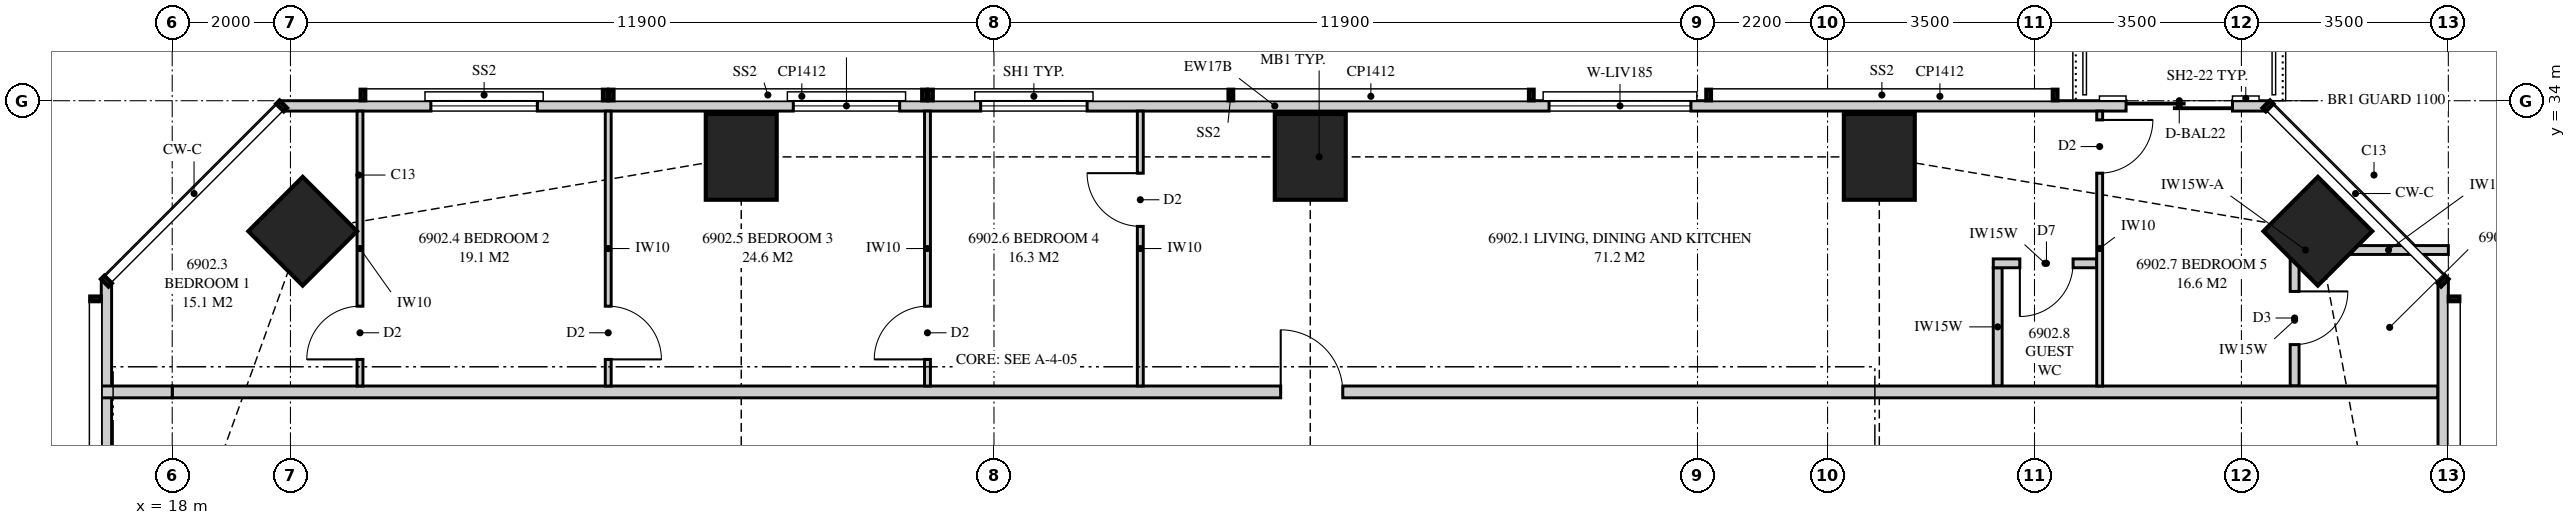
"""IFC4 building model, lengths in metres.
Left out: names, types, materials, properties, quantities, classifications, styles, units other than length and angle.
Written with IfcOpenShell. Run it as: python <this file> out.ifc"""

import sys

from ifc_helpers import new_model, si_unit, direction, frame, frame_2d, origin, origin_2d, place, context, subcontext, project, spatial, polyline, rectangle, outline, extrude, element, fill, save


model = new_model("IFC4")
c1 = context("Model", 3, precision=1e-05, world=origin(), true_north=direction((0.0, 1.0)))
c2 = subcontext(c1, "Body", "Model", "MODEL_VIEW")
j1 = project(units=[si_unit("LENGTHUNIT", "METRE"), si_unit("PLANEANGLEUNIT", "RADIAN")], contexts=[c1])
p1 = place(None, origin())
s1 = spatial("IfcSite", under=j1, at=p1, CompositionType="ELEMENT")
p2 = place(p1, origin())
s2 = spatial("IfcBuilding", under=s1, at=p2, CompositionType="ELEMENT")
p3 = place(p2, frame((0.0, 0.0, 252.95)))
s3 = spatial("IfcBuildingStorey", under=s2, at=p3, CompositionType="ELEMENT", Elevation=252.95)
p4 = place(p3, frame((54.293, 31.793, 0.0), z_axis=(0.0, 0.0, 1.0), x_axis=(0.707106781187, 0.707106781187, 0.0)))
e1 = element("IfcColumn", 1, at=p4, inside=s3, PredefinedType="COLUMN", context=c2, shape_type="SweptSolid", body=[
    extrude(rectangle(XDim=1.3, YDim=1.3, at=origin_2d()), origin(), (0.0, 0.0, 1.0), 3.5),
])
for number, where, z_axis, x_axis in (
    (2, (46.875, 33.05, 0.0), (0.0, 0.0, 1.0), (0.0, 1.0, 0.0)),
    (3, (37.25, 33.05, 0.0), (0.0, 0.0, 1.0), (0.0, 1.0, 0.0)),
    (4, (27.625, 33.05, 0.0), (0.0, 0.0, 1.0), (0.0, 1.0, 0.0)),
):
    element("IfcColumn", number, at=place(p3, frame(where, z_axis=z_axis, x_axis=x_axis)), inside=s3, PredefinedType="COLUMN", context=c2, shape_type="SweptSolid", body=[
        extrude(rectangle(XDim=1.45, YDim=1.2, at=origin_2d()), origin(), (0.0, 0.0, 1.0), 3.5),
    ])
p5 = place(p3, frame((20.207, 31.793, 0.0), z_axis=(0.0, 0.0, 1.0), x_axis=(0.707106781187, 0.707106781187, 0.0)))
e5 = element("IfcColumn", 5, at=p5, inside=s3, PredefinedType="COLUMN", context=c2, shape_type="SweptSolid", body=[
    extrude(rectangle(XDim=1.3, YDim=1.3, at=origin_2d()), origin(), (0.0, 0.0, 1.0), 3.5),
])
p6 = place(p3, frame((56.413, 3.051, 0.0), z_axis=(0.0, 0.0, 1.0), x_axis=(0.0, 1.0, 0.0)))
e6 = element("IfcWall", 6, at=p6, inside=s3, PredefinedType="SOLIDWALL", context=c2, shape_type="SweptSolid", body=[
    extrude(outline(polyline([(0.0, 0.0), (27.897, 0.0), (27.897, 3.26), (22.157, 3.26), (22.157, 2.3), (22.092, 2.3), (22.092, 3.26), (21.949, 3.26), (21.949, 2.3), (9.949, 2.3), (9.949, 3.26), (9.858, 3.26), (9.858, 2.3), (9.688, 2.3), (9.688, 3.26), (0.0, 3.26), (0.0, 0.0)])), frame((0.0, 0.087, 0.0), z_axis=(0.0, -1.0, 0.0), x_axis=(1.0, 0.0, 0.0)), (0.0, 0.0, 1.0), 0.175),
])
p7 = place(p6, frame((10.831, 0.0, 0.4)))
e7 = element("IfcOpeningElement", 7, at=p7, cuts=e6, PredefinedType="OPENING", context=c2, shape_type="SweptSolid", body=[
    extrude(rectangle(XDim=2.4, YDim=1.85, at=frame_2d((1.2, 0.925))), frame((0.0, 0.097, 0.0), z_axis=(0.0, -1.0, 0.0), x_axis=(1.0, 0.0, 0.0)), (0.0, 0.0, 1.0), 0.195),
])
p8 = place(p6, frame((15.074, 0.0, 0.0)))
e8 = element("IfcOpeningElement", 8, at=p8, cuts=e6, PredefinedType="OPENING", context=c2, shape_type="SweptSolid", body=[
    extrude(rectangle(XDim=1.8, YDim=2.25, at=frame_2d((0.9, 1.125))), frame((0.0, 0.097, 0.0), z_axis=(0.0, -1.0, 0.0), x_axis=(1.0, 0.0, 0.0)), (0.0, 0.0, 1.0), 0.195),
])
p9 = place(p6, frame((18.699, 0.0, 0.4)))
e9 = element("IfcOpeningElement", 9, at=p9, cuts=e6, PredefinedType="OPENING", context=c2, shape_type="SweptSolid", body=[
    extrude(rectangle(XDim=2.4, YDim=1.85, at=frame_2d((1.2, 0.925))), frame((0.0, 0.097, 0.0), z_axis=(0.0, -1.0, 0.0), x_axis=(1.0, 0.0, 0.0)), (0.0, 0.0, 1.0), 0.195),
])
p10 = place(p3, frame((53.449, 33.913, 0.0), z_axis=(0.0, 0.0, 1.0), x_axis=(-1.0, 0.0, 0.0)))
e10 = element("IfcWall", 10, at=p10, inside=s3, PredefinedType="SOLIDWALL", context=c2, shape_type="SweptSolid", body=[
    extrude(outline(polyline([(0.0, 0.0), (33.597, 0.0), (33.597, 3.26), (26.039, 3.26), (26.039, 2.3), (25.955, 2.3), (25.955, 3.26), (25.824, 3.26), (25.824, 2.3), (6.574, 2.3), (6.574, 3.26), (6.442, 3.26), (6.442, 2.3), (6.359, 2.3), (6.359, 3.26), (0.0, 3.26), (0.0, 0.0)])), frame((0.0, 0.087, 0.0), z_axis=(0.0, -1.0, 0.0), x_axis=(1.0, 0.0, 0.0)), (0.0, 0.0, 1.0), 0.175),
])
p11 = place(p10, frame((0.6, 0.0, 0.0)))
e11 = element("IfcOpeningElement", 11, at=p11, cuts=e10, PredefinedType="OPENING", context=c2, shape_type="SweptSolid", body=[
    extrude(rectangle(XDim=1.8, YDim=2.25, at=frame_2d((0.9, 1.125))), frame((0.0, 0.097, 0.0), z_axis=(0.0, -1.0, 0.0), x_axis=(1.0, 0.0, 0.0)), (0.0, 0.0, 1.0), 0.195),
])
p12 = place(p10, frame((9.76, 0.0, 0.4)))
e12 = element("IfcOpeningElement", 12, at=p12, cuts=e10, PredefinedType="OPENING", context=c2, shape_type="SweptSolid", body=[
    extrude(rectangle(XDim=2.4, YDim=1.85, at=frame_2d((1.2, 0.925))), frame((0.0, 0.097, 0.0), z_axis=(0.0, -1.0, 0.0), x_axis=(1.0, 0.0, 0.0)), (0.0, 0.0, 1.0), 0.195),
])
p13 = place(p10, frame((19.974, 0.0, 0.4)))
e13 = element("IfcOpeningElement", 13, at=p13, cuts=e10, PredefinedType="OPENING", context=c2, shape_type="SweptSolid", body=[
    extrude(rectangle(XDim=1.8, YDim=1.85, at=frame_2d((0.9, 0.925))), frame((0.0, 0.097, 0.0), z_axis=(0.0, -1.0, 0.0), x_axis=(1.0, 0.0, 0.0)), (0.0, 0.0, 1.0), 0.195),
])
p14 = place(p10, frame((23.144, 0.0, 0.4)))
e14 = element("IfcOpeningElement", 14, at=p14, cuts=e10, PredefinedType="OPENING", context=c2, shape_type="SweptSolid", body=[
    extrude(rectangle(XDim=1.8, YDim=1.85, at=frame_2d((0.9, 0.925))), frame((0.0, 0.097, 0.0), z_axis=(0.0, -1.0, 0.0), x_axis=(1.0, 0.0, 0.0)), (0.0, 0.0, 1.0), 0.195),
])
p15 = place(p10, frame((29.273, 0.0, 0.4)))
e15 = element("IfcOpeningElement", 15, at=p15, cuts=e10, PredefinedType="OPENING", context=c2, shape_type="SweptSolid", body=[
    extrude(rectangle(XDim=1.8, YDim=1.85, at=frame_2d((0.9, 0.925))), frame((0.0, 0.097, 0.0), z_axis=(0.0, -1.0, 0.0), x_axis=(1.0, 0.0, 0.0)), (0.0, 0.0, 1.0), 0.195),
])
p16 = place(p3, frame((16.887, 30.949, 0.0), z_axis=(0.0, 0.0, 1.0), x_axis=(0.0, -1.0, 0.0)))
e16 = element("IfcWall", 16, at=p16, inside=s3, PredefinedType="SOLIDWALL", context=c2, shape_type="SweptSolid", body=[
    extrude(outline(polyline([(0.0, 0.0), (27.897, 0.0), (27.897, 3.26), (18.148, 3.26), (18.148, 2.3), (18.125, 2.3), (18.125, 3.26), (17.949, 3.26), (17.949, 2.3), (5.949, 2.3), (5.949, 3.26), (0.0, 3.26), (0.0, 0.0)])), frame((0.0, 0.087, 0.0), z_axis=(0.0, -1.0, 0.0), x_axis=(1.0, 0.0, 0.0)), (0.0, 0.0, 1.0), 0.175),
])
p17 = place(p16, frame((11.849, 0.0, 0.4)))
e17 = element("IfcOpeningElement", 17, at=p17, cuts=e16, PredefinedType="OPENING", context=c2, shape_type="SweptSolid", body=[
    extrude(rectangle(XDim=1.2, YDim=1.85, at=frame_2d((0.6, 0.925))), frame((0.0, 0.097, 0.0), z_axis=(0.0, -1.0, 0.0), x_axis=(1.0, 0.0, 0.0)), (0.0, 0.0, 1.0), 0.195),
])
p18 = place(p3, frame((18.0, 29.075, 0.0), z_axis=(0.0, 0.0, 1.0), x_axis=(1.0, 0.0, 0.0)))
e18 = element("IfcWall", 18, at=p18, inside=s3, PredefinedType="PARTITIONING", context=c2, shape_type="SweptSolid", body=[
    extrude(outline(polyline([(0.0, 0.0), (38.325, 0.0), (38.325, 3.26), (37.721, 3.26), (37.721, 2.3), (35.87, 2.3), (35.87, 3.26), (30.185, 3.26), (30.185, 2.66), (27.565, 2.66), (27.565, 3.26), (20.56, 3.26), (20.56, 2.66), (17.94, 2.66), (17.94, 3.26), (10.935, 3.26), (10.935, 2.66), (8.315, 2.66), (8.315, 3.26), (2.192, 3.26), (2.192, 2.3), (0.256, 2.3), (0.256, 3.26), (0.0, 3.26), (0.0, 0.0)])), frame((0.0, 0.1, 0.0), z_axis=(0.0, -1.0, 0.0), x_axis=(1.0, 0.0, 0.0)), (0.0, 0.0, 1.0), 0.2),
])
p19 = place(p18, frame((18.75, 0.0, 0.0)))
e19 = element("IfcOpeningElement", 19, at=p19, cuts=e18, PredefinedType="OPENING", context=c2, shape_type="SweptSolid", body=[
    extrude(rectangle(XDim=1.05, YDim=2.2, at=frame_2d((0.525, 1.1))), frame((0.0, 0.11, 0.0), z_axis=(0.0, -1.0, 0.0), x_axis=(1.0, 0.0, 0.0)), (0.0, 0.0, 1.0), 0.22),
])
p20 = place(p3, frame((53.975, 31.475, 0.0), z_axis=(0.0, 0.0, 1.0), x_axis=(1.0, 0.0, 0.0)))
e20 = element("IfcWall", 20, at=p20, inside=s3, PredefinedType="PLUMBINGWALL", context=c2, shape_type="SweptSolid", body=[
    extrude(rectangle(XDim=0.217, YDim=0.15, at=frame_2d((0.108, 0.0))), origin(), (0.0, 0.0, 1.0), 2.3),
])
p21 = place(p3, frame((54.478, 31.475, 0.0), z_axis=(0.0, 0.0, 1.0), x_axis=(1.0, 0.0, 0.0)))
e21 = element("IfcWall", 21, at=p21, inside=s3, PredefinedType="PLUMBINGWALL", context=c2, shape_type="SweptSolid", body=[
    extrude(outline(polyline([(0.774, 3.26), (0.774, 2.3), (0.325, 2.3), (0.0, 1.15), (0.325, 0.0), (2.022, 0.0), (2.022, 3.26), (0.774, 3.26)])), frame((0.0, 0.075, 0.0), z_axis=(0.0, -1.0, 0.0), x_axis=(1.0, 0.0, 0.0)), (0.0, 0.0, 1.0), 0.15),
])
p22 = place(p3, frame((53.9, 31.4, 0.0), z_axis=(0.0, 0.0, 1.0), x_axis=(0.0, -1.0, 0.0)))
e22 = element("IfcWall", 22, at=p22, inside=s3, PredefinedType="PLUMBINGWALL", context=c2, shape_type="SweptSolid", body=[
    extrude(outline(polyline([(0.0, 0.0), (2.225, 0.0), (2.225, 3.26), (2.225, 2.3), (0.438, 2.3), (0.0, 2.3), (0.0, 3.26), (0.0, 0.0)])), frame((0.0, 0.075, 0.0), z_axis=(0.0, -1.0, 0.0), x_axis=(1.0, 0.0, 0.0)), (0.0, 0.0, 1.0), 0.15),
])
p23 = place(p22, frame((0.625, 0.0, 0.0)))
e23 = element("IfcOpeningElement", 23, at=p23, cuts=e22, PredefinedType="OPENING", context=c2, shape_type="SweptSolid", body=[
    extrude(rectangle(XDim=0.9, YDim=2.1, at=frame_2d((0.45, 1.05))), frame((0.0, 0.085, 0.0), z_axis=(0.0, -1.0, 0.0), x_axis=(1.0, 0.0, 0.0)), (0.0, 0.0, 1.0), 0.17),
])
p24 = place(p3, frame((21.176, 33.825, 0.0), z_axis=(0.0, 0.0, 1.0), x_axis=(0.0, -1.0, 0.0)))
e24 = element("IfcWall", 24, at=p24, inside=s3, PredefinedType="PARTITIONING", context=c2, shape_type="SweptSolid", body=[
    extrude(outline(polyline([(0.0, 0.0), (4.65, 0.0), (4.65, 3.26), (2.74, 3.26), (2.74, 2.3), (0.996, 2.3), (0.996, 3.26), (0.0, 3.26), (0.0, 0.0)])), frame((0.0, 0.05, 0.0), z_axis=(0.0, -1.0, 0.0), x_axis=(1.0, 0.0, 0.0)), (0.0, 0.0, 1.0), 0.1),
])
p25 = place(p24, frame((3.3, 0.0, 0.0)))
e25 = element("IfcOpeningElement", 25, at=p25, cuts=e24, PredefinedType="OPENING", context=c2, shape_type="SweptSolid", body=[
    extrude(rectangle(XDim=0.9, YDim=2.1, at=frame_2d((0.45, 1.05))), frame((0.0, 0.06, 0.0), z_axis=(0.0, -1.0, 0.0), x_axis=(1.0, 0.0, 0.0)), (0.0, 0.0, 1.0), 0.12),
])
p26 = place(p3, frame((25.375, 33.825, 0.0), z_axis=(0.0, 0.0, 1.0), x_axis=(0.0, -1.0, 0.0)))
e26 = element("IfcWall", 26, at=p26, inside=s3, PredefinedType="PARTITIONING", context=c2, shape_type="SweptSolid", body=[
    extrude(outline(polyline([(0.0, 0.0), (4.65, 0.0), (4.65, 3.26), (2.029, 3.26), (2.029, 2.3), (0.284, 2.3), (0.284, 3.26), (0.0, 3.26), (0.0, 0.0)])), frame((0.0, 0.05, 0.0), z_axis=(0.0, -1.0, 0.0), x_axis=(1.0, 0.0, 0.0)), (0.0, 0.0, 1.0), 0.1),
])
p27 = place(p26, frame((3.3, 0.0, 0.0)))
e27 = element("IfcOpeningElement", 27, at=p27, cuts=e26, PredefinedType="OPENING", context=c2, shape_type="SweptSolid", body=[
    extrude(rectangle(XDim=0.9, YDim=2.1, at=frame_2d((0.45, 1.05))), frame((0.0, 0.06, 0.0), z_axis=(0.0, -1.0, 0.0), x_axis=(1.0, 0.0, 0.0)), (0.0, 0.0, 1.0), 0.12),
])
p28 = place(p3, frame((30.775, 33.825, 0.0), z_axis=(0.0, 0.0, 1.0), x_axis=(0.0, -1.0, 0.0)))
e28 = element("IfcWall", 28, at=p28, inside=s3, PredefinedType="PARTITIONING", context=c2, shape_type="SweptSolid", body=[
    extrude(outline(polyline([(0.0, 0.0), (4.65, 0.0), (4.65, 3.26), (1.635, 3.26), (1.635, 2.3), (0.0, 2.3), (0.0, 3.26), (0.0, 0.0)])), frame((0.0, 0.05, 0.0), z_axis=(0.0, -1.0, 0.0), x_axis=(1.0, 0.0, 0.0)), (0.0, 0.0, 1.0), 0.1),
])
p29 = place(p28, frame((3.3, 0.0, 0.0)))
e29 = element("IfcOpeningElement", 29, at=p29, cuts=e28, PredefinedType="OPENING", context=c2, shape_type="SweptSolid", body=[
    extrude(rectangle(XDim=0.9, YDim=2.1, at=frame_2d((0.45, 1.05))), frame((0.0, 0.06, 0.0), z_axis=(0.0, -1.0, 0.0), x_axis=(1.0, 0.0, 0.0)), (0.0, 0.0, 1.0), 0.12),
])
p30 = place(p3, frame((34.375, 33.825, 0.0), z_axis=(0.0, 0.0, 1.0), x_axis=(0.0, -1.0, 0.0)))
e30 = element("IfcWall", 30, at=p30, inside=s3, PredefinedType="PARTITIONING", context=c2, shape_type="SweptSolid", body=[
    extrude(outline(polyline([(0.0, 0.0), (4.65, 0.0), (4.65, 3.26), (1.635, 3.26), (1.635, 2.3), (0.0, 2.3), (0.0, 3.26), (0.0, 0.0)])), frame((0.0, 0.05, 0.0), z_axis=(0.0, -1.0, 0.0), x_axis=(1.0, 0.0, 0.0)), (0.0, 0.0, 1.0), 0.1),
])
p31 = place(p30, frame((1.05, 0.0, 0.0)))
e31 = element("IfcOpeningElement", 31, at=p31, cuts=e30, PredefinedType="OPENING", context=c2, shape_type="SweptSolid", body=[
    extrude(rectangle(XDim=0.9, YDim=2.1, at=frame_2d((0.45, 1.05))), frame((0.0, 0.06, 0.0), z_axis=(0.0, -1.0, 0.0), x_axis=(1.0, 0.0, 0.0)), (0.0, 0.0, 1.0), 0.12),
])
p32 = place(p3, frame((50.603, 33.825, 0.0), z_axis=(0.0, 0.0, 1.0), x_axis=(0.0, -1.0, 0.0)))
e32 = element("IfcWall", 32, at=p32, inside=s3, PredefinedType="PARTITIONING", context=c2, shape_type="SweptSolid", body=[
    extrude(outline(polyline([(0.0, 0.0), (4.65, 0.0), (4.65, 3.26), (2.279, 3.26), (2.279, 2.3), (0.534, 2.3), (0.534, 3.26), (0.0, 3.26), (0.0, 0.0)])), frame((0.0, 0.05, 0.0), z_axis=(0.0, -1.0, 0.0), x_axis=(1.0, 0.0, 0.0)), (0.0, 0.0, 1.0), 0.1),
])
p33 = place(p32, frame((0.15, 0.0, 0.0)))
e33 = element("IfcOpeningElement", 33, at=p33, cuts=e32, PredefinedType="OPENING", context=c2, shape_type="SweptSolid", body=[
    extrude(rectangle(XDim=0.9, YDim=2.1, at=frame_2d((0.45, 1.05))), frame((0.0, 0.06, 0.0), z_axis=(0.0, -1.0, 0.0), x_axis=(1.0, 0.0, 0.0)), (0.0, 0.0, 1.0), 0.12),
])
p34 = place(p3, frame((16.8, 29.075, 0.0), z_axis=(0.0, 0.0, 1.0), x_axis=(1.0, 0.0, 0.0)))
e34 = element("IfcWall", 34, at=p34, inside=s3, PredefinedType="PARTITIONING", context=c2, shape_type="SweptSolid", body=[
    extrude(rectangle(XDim=1.2, YDim=0.2, at=frame_2d((0.6, 0.0))), origin(), (0.0, 0.0, 1.0), 3.26),
])
p35 = place(p3, frame((50.552, 31.25, 0.0), z_axis=(0.0, 0.0, 1.0), x_axis=(-1.0, 0.0, 0.0)))
e35 = element("IfcWall", 35, at=p35, inside=s3, PredefinedType="PLUMBINGWALL", context=c2, shape_type="SweptSolid", body=[
    extrude(rectangle(XDim=1.75, YDim=0.15, at=frame_2d((0.875, 0.0))), origin(), (0.0, 0.0, 1.0), 3.26),
])
p36 = place(p35, frame((0.4, 0.0, 0.0)))
e36 = element("IfcOpeningElement", 36, at=p36, cuts=e35, PredefinedType="OPENING", context=c2, shape_type="SweptSolid", body=[
    extrude(rectangle(XDim=0.9, YDim=2.1, at=frame_2d((0.45, 1.05))), frame((0.0, 0.085, 0.0), z_axis=(0.0, -1.0, 0.0), x_axis=(1.0, 0.0, 0.0)), (0.0, 0.0, 1.0), 0.17),
])
p37 = place(p3, frame((48.877, 29.175, 0.0), z_axis=(0.0, 0.0, 1.0), x_axis=(0.0, 1.0, 0.0)))
e37 = element("IfcWall", 37, at=p37, inside=s3, PredefinedType="PLUMBINGWALL", context=c2, shape_type="SweptSolid", body=[
    extrude(rectangle(XDim=2.0, YDim=0.15, at=frame_2d((1.0, 0.0))), origin(), (0.0, 0.0, 1.0), 3.26),
])
p38 = place(p11, origin())
e38 = element("IfcDoor", 38, at=p38, inside=s3, OperationType="SLIDING_TO_LEFT", PredefinedType="DOOR", context=c2, shape_type="SweptSolid", body=[
    extrude(rectangle(XDim=1.8, YDim=2.25, at=frame_2d((0.9, 1.125))), frame((0.0, 0.025, 0.0), z_axis=(0.0, -1.0, 0.0), x_axis=(1.0, 0.0, 0.0)), (0.0, 0.0, 1.0), 0.05),
])
fill(e11, e38)
p39 = place(p12, origin())
e39 = element("IfcWindow", 39, at=p39, inside=s3, PartitioningType="SINGLE_PANEL", PredefinedType="WINDOW", context=c2, shape_type="SweptSolid", body=[
    extrude(rectangle(XDim=2.4, YDim=1.85, at=frame_2d((1.2, 0.925))), frame((0.0, 0.03, 0.0), z_axis=(0.0, -1.0, 0.0), x_axis=(1.0, 0.0, 0.0)), (0.0, 0.0, 1.0), 0.06),
])
fill(e12, e39)
p40 = place(p13, origin())
e40 = element("IfcWindow", 40, at=p40, inside=s3, PartitioningType="SINGLE_PANEL", PredefinedType="WINDOW", context=c2, shape_type="SweptSolid", body=[
    extrude(rectangle(XDim=1.8, YDim=1.85, at=frame_2d((0.9, 0.925))), frame((0.0, 0.03, 0.0), z_axis=(0.0, -1.0, 0.0), x_axis=(1.0, 0.0, 0.0)), (0.0, 0.0, 1.0), 0.06),
])
fill(e13, e40)
p41 = place(p14, origin())
e41 = element("IfcWindow", 41, at=p41, inside=s3, PartitioningType="SINGLE_PANEL", PredefinedType="WINDOW", context=c2, shape_type="SweptSolid", body=[
    extrude(rectangle(XDim=1.8, YDim=1.85, at=frame_2d((0.9, 0.925))), frame((0.0, 0.03, 0.0), z_axis=(0.0, -1.0, 0.0), x_axis=(1.0, 0.0, 0.0)), (0.0, 0.0, 1.0), 0.06),
])
fill(e14, e41)
p42 = place(p15, origin())
e42 = element("IfcWindow", 42, at=p42, inside=s3, PartitioningType="SINGLE_PANEL", PredefinedType="WINDOW", context=c2, shape_type="SweptSolid", body=[
    extrude(rectangle(XDim=1.8, YDim=1.85, at=frame_2d((0.9, 0.925))), frame((0.0, 0.03, 0.0), z_axis=(0.0, -1.0, 0.0), x_axis=(1.0, 0.0, 0.0)), (0.0, 0.0, 1.0), 0.06),
])
fill(e15, e42)
p43 = place(p19, origin())
e43 = element("IfcDoor", 43, at=p43, inside=s3, OperationType="SINGLE_SWING_LEFT", PredefinedType="DOOR", context=c2, shape_type="SweptSolid", body=[
    extrude(rectangle(XDim=1.05, YDim=2.2, at=frame_2d((0.525, 1.1))), frame((0.0, 0.025, 0.0), z_axis=(0.0, -1.0, 0.0), x_axis=(1.0, 0.0, 0.0)), (0.0, 0.0, 1.0), 0.05),
])
fill(e19, e43)
p44 = place(p23, origin())
e44 = element("IfcDoor", 44, at=p44, inside=s3, OperationType="SINGLE_SWING_LEFT", PredefinedType="DOOR", context=c2, shape_type="SweptSolid", body=[
    extrude(rectangle(XDim=0.9, YDim=2.1, at=frame_2d((0.45, 1.05))), frame((0.0, 0.025, 0.0), z_axis=(0.0, -1.0, 0.0), x_axis=(1.0, 0.0, 0.0)), (0.0, 0.0, 1.0), 0.05),
])
fill(e23, e44)
p45 = place(p25, frame((0.9, 0.0, 0.0), z_axis=(0.0, 0.0, 1.0), x_axis=(-1.0, 0.0, 0.0)))
e45 = element("IfcDoor", 45, at=p45, inside=s3, OperationType="SINGLE_SWING_LEFT", PredefinedType="DOOR", context=c2, shape_type="SweptSolid", body=[
    extrude(rectangle(XDim=0.9, YDim=2.1, at=frame_2d((0.45, 1.05))), frame((0.0, 0.025, 0.0), z_axis=(0.0, -1.0, 0.0), x_axis=(1.0, 0.0, 0.0)), (0.0, 0.0, 1.0), 0.05),
])
fill(e25, e45)
p46 = place(p27, origin())
e46 = element("IfcDoor", 46, at=p46, inside=s3, OperationType="SINGLE_SWING_RIGHT", PredefinedType="DOOR", context=c2, shape_type="SweptSolid", body=[
    extrude(rectangle(XDim=0.9, YDim=2.1, at=frame_2d((0.45, 1.05))), frame((0.0, 0.025, 0.0), z_axis=(0.0, -1.0, 0.0), x_axis=(1.0, 0.0, 0.0)), (0.0, 0.0, 1.0), 0.05),
])
fill(e27, e46)
p47 = place(p29, frame((0.9, 0.0, 0.0), z_axis=(0.0, 0.0, 1.0), x_axis=(-1.0, 0.0, 0.0)))
e47 = element("IfcDoor", 47, at=p47, inside=s3, OperationType="SINGLE_SWING_LEFT", PredefinedType="DOOR", context=c2, shape_type="SweptSolid", body=[
    extrude(rectangle(XDim=0.9, YDim=2.1, at=frame_2d((0.45, 1.05))), frame((0.0, 0.025, 0.0), z_axis=(0.0, -1.0, 0.0), x_axis=(1.0, 0.0, 0.0)), (0.0, 0.0, 1.0), 0.05),
])
fill(e29, e47)
p48 = place(p31, frame((0.9, 0.0, 0.0), z_axis=(0.0, 0.0, 1.0), x_axis=(-1.0, 0.0, 0.0)))
e48 = element("IfcDoor", 48, at=p48, inside=s3, OperationType="SINGLE_SWING_RIGHT", PredefinedType="DOOR", context=c2, shape_type="SweptSolid", body=[
    extrude(rectangle(XDim=0.9, YDim=2.1, at=frame_2d((0.45, 1.05))), frame((0.0, 0.025, 0.0), z_axis=(0.0, -1.0, 0.0), x_axis=(1.0, 0.0, 0.0)), (0.0, 0.0, 1.0), 0.05),
])
fill(e31, e48)
p49 = place(p33, origin())
e49 = element("IfcDoor", 49, at=p49, inside=s3, OperationType="SINGLE_SWING_LEFT", PredefinedType="DOOR", context=c2, shape_type="SweptSolid", body=[
    extrude(rectangle(XDim=0.9, YDim=2.1, at=frame_2d((0.45, 1.05))), frame((0.0, 0.025, 0.0), z_axis=(0.0, -1.0, 0.0), x_axis=(1.0, 0.0, 0.0)), (0.0, 0.0, 1.0), 0.05),
])
fill(e33, e49)
p50 = place(p36, origin())
e50 = element("IfcDoor", 50, at=p50, inside=s3, OperationType="SINGLE_SWING_RIGHT", PredefinedType="DOOR", context=c2, shape_type="SweptSolid", body=[
    extrude(rectangle(XDim=0.9, YDim=2.1, at=frame_2d((0.45, 1.05))), frame((0.0, 0.025, 0.0), z_axis=(0.0, -1.0, 0.0), x_axis=(1.0, 0.0, 0.0)), (0.0, 0.0, 1.0), 0.05),
])
fill(e36, e50)
save(model, sys.argv[1])
